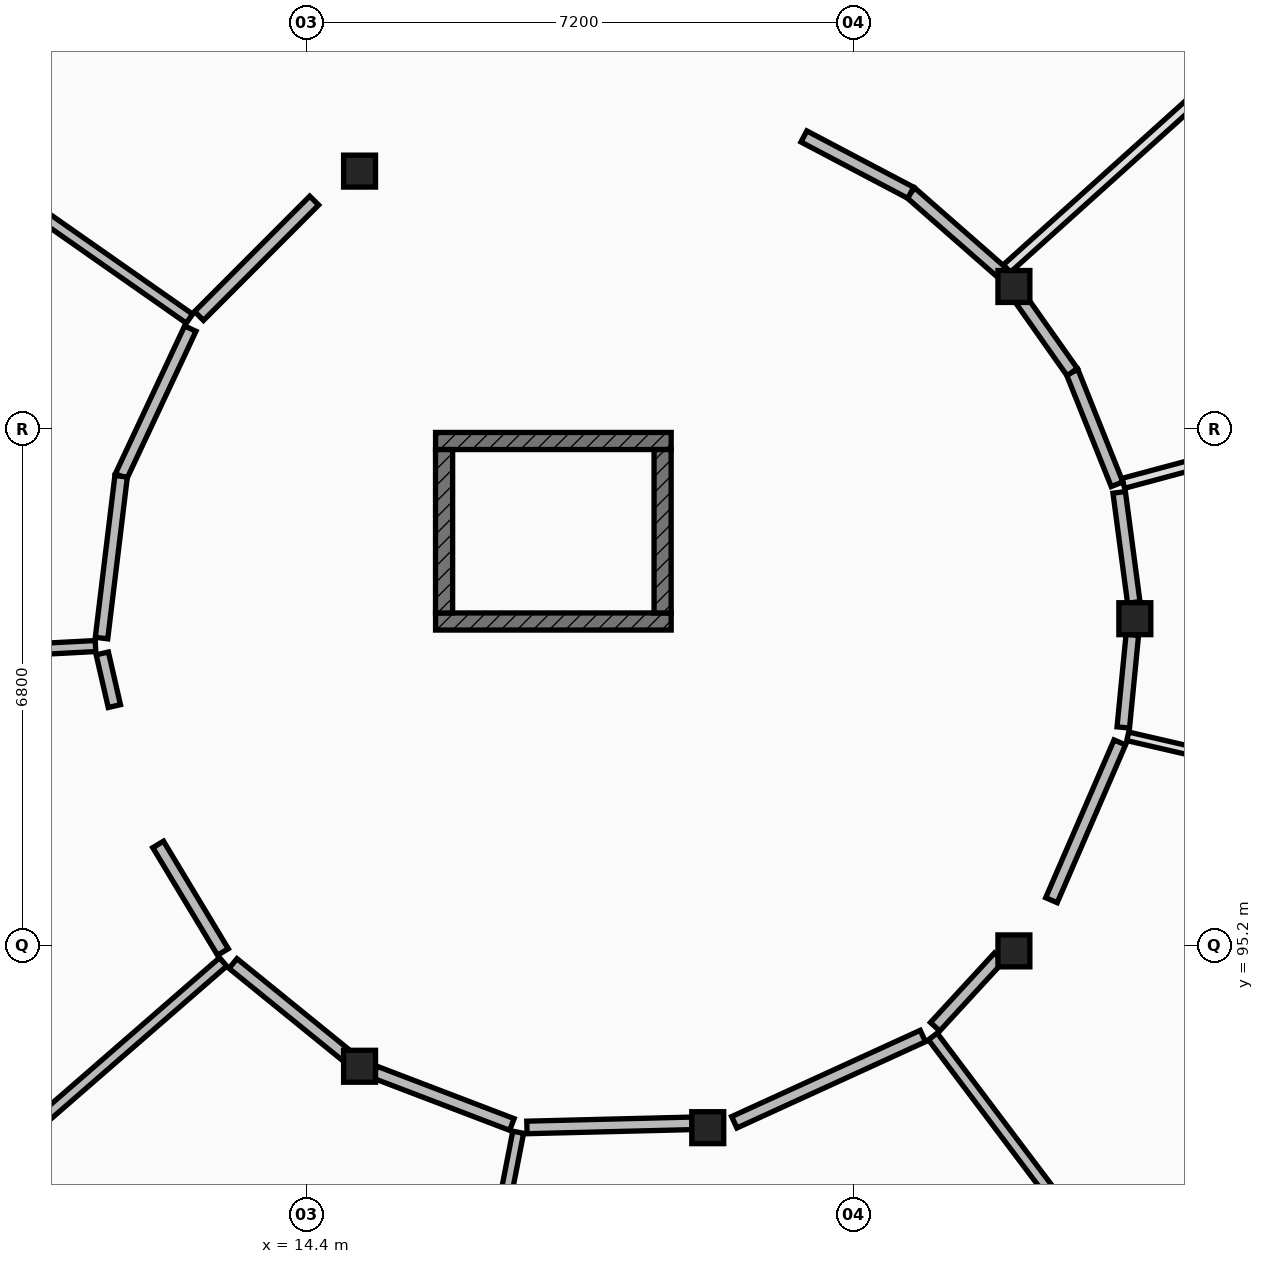
"""IFC4 building model, lengths in metres.
Left out: names, types, materials, properties, quantities, classifications, styles, units other than length and angle.
Written with IfcOpenShell. Run it as: python <this file> out.ifc"""

import sys

from ifc_helpers import new_model, si_unit, direction, frame, frame_2d, origin, origin_2d, place, context, subcontext, project, spatial, rectangle, extrude, element, fill, save


model = new_model("IFC4")
c1 = context("Model", 3, precision=1e-05, world=origin(), true_north=direction((0.0, 1.0)))
c2 = subcontext(c1, "Body", "Model", "MODEL_VIEW")
j1 = project(units=[si_unit("LENGTHUNIT", "METRE"), si_unit("PLANEANGLEUNIT", "RADIAN")], contexts=[c1])
p1 = place(None, origin())
s1 = spatial("IfcSite", under=j1, at=p1, CompositionType="ELEMENT")
p2 = place(p1, origin())
s2 = spatial("IfcBuilding", under=s1, at=p2, CompositionType="ELEMENT")
p3 = place(p2, frame((0.0, 0.0, 4.55)))
s3 = spatial("IfcBuildingStorey", under=s2, at=p3, CompositionType="ELEMENT", Elevation=4.55)
for number, where, z_axis, x_axis in (
    (1, (25.3, 99.5, 0.0), (0.0, 0.0, 1.0), (1.0, 0.0, 0.0)),
    (2, (23.709, 103.871, 0.0), (0.0, 0.0, 1.0), (1.0, 0.0, 0.0)),
    (3, (15.1, 105.389, 0.0), (0.0, 0.0, 1.0), (1.0, 0.0, 0.0)),
    (4, (15.1, 93.611, 0.0), (0.0, 0.0, 1.0), (1.0, 0.0, 0.0)),
    (5, (19.681, 92.803, 0.0), (0.0, 0.0, 1.0), (1.0, 0.0, 0.0)),
    (6, (23.709, 95.129, 0.0), (0.0, 0.0, 1.0), (1.0, 0.0, 0.0)),
):
    element("IfcColumn", number, at=place(p3, frame(where, z_axis=z_axis, x_axis=x_axis)), inside=s3, PredefinedType="COLUMN", context=c2, shape_type="SweptSolid", body=[
        extrude(rectangle(XDim=0.42, YDim=0.42, at=origin_2d()), origin(), (0.0, 0.0, 1.0), 4.2),
    ])
p4 = place(p3, frame((16.1, 99.463, 0.0), z_axis=(0.0, 0.0, 1.0), x_axis=(1.0, 0.0, 0.0)))
e7 = element("IfcWall", 7, at=p4, inside=s3, PredefinedType="SHEAR", context=c2, shape_type="SweptSolid", body=[
    extrude(rectangle(XDim=3.1, YDim=0.225, at=frame_2d((1.55, 0.0))), origin(), (0.0, 0.0, 1.0), 3.955),
])
p5 = place(p4, frame((0.95, 0.0, 0.0)))
e8 = element("IfcOpeningElement", 8, at=p5, cuts=e7, PredefinedType="OPENING", context=c2, shape_type="SweptSolid", body=[
    extrude(rectangle(XDim=1.2, YDim=2.2, at=frame_2d((0.6, 1.1))), frame((0.0, 0.123, 0.0), z_axis=(0.0, -1.0, 0.0), x_axis=(1.0, 0.0, 0.0)), (0.0, 0.0, 1.0), 0.245),
])
p6 = place(p3, frame((16.1, 101.838, 0.0), z_axis=(0.0, 0.0, 1.0), x_axis=(1.0, 0.0, 0.0)))
e9 = element("IfcWall", 9, at=p6, inside=s3, PredefinedType="SHEAR", context=c2, shape_type="SweptSolid", body=[
    extrude(rectangle(XDim=3.1, YDim=0.225, at=frame_2d((1.55, 0.0))), origin(), (0.0, 0.0, 1.0), 3.955),
])
for number, where, z_axis, x_axis in (
    (10, (16.212, 99.575, 0.0), (0.0, 0.0, 1.0), (0.0, 1.0, 0.0)),
    (11, (19.087, 99.575, 0.0), (0.0, 0.0, 1.0), (0.0, 1.0, 0.0)),
):
    element("IfcWall", number, at=place(p3, frame(where, z_axis=z_axis, x_axis=x_axis)), inside=s3, PredefinedType="SHEAR", context=c2, shape_type="SweptSolid", body=[
        extrude(rectangle(XDim=2.15, YDim=0.225, at=frame_2d((1.075, 0.0))), origin(), (0.0, 0.0, 1.0), 3.955),
    ])
p7 = place(p3, frame((12.862, 103.448, 0.0), z_axis=(0.0, 0.0, 1.0), x_axis=(-0.819231920519, 0.573462344363, 0.0)))
e12 = element("IfcWall", 12, at=p7, inside=s3, PredefinedType="PARTITIONING", context=c2, shape_type="SweptSolid", body=[
    extrude(rectangle(XDim=5.868, YDim=0.145, at=frame_2d((2.934, 0.0))), origin(), (0.0, 0.0, 1.0), 3.284),
])
p8 = place(p3, frame((11.626, 99.14, 0.0), z_axis=(0.0, 0.0, 1.0), x_axis=(-0.998634316819, -0.052244629109, 0.0)))
e13 = element("IfcWall", 13, at=p8, inside=s3, PredefinedType="PARTITIONING", context=c2, shape_type="SweptSolid", body=[
    extrude(rectangle(XDim=0.897, YDim=0.145, at=frame_2d((0.449, 0.0))), origin(), (0.0, 0.0, 1.0), 3.284),
])
p9 = place(p3, frame((13.305, 94.984, 0.0), z_axis=(0.0, 0.0, 1.0), x_axis=(-0.754647404393, -0.656130547256, 0.0)))
e14 = element("IfcWall", 14, at=p9, inside=s3, PredefinedType="PARTITIONING", context=c2, shape_type="SweptSolid", body=[
    extrude(rectangle(XDim=5.898, YDim=0.145, at=frame_2d((2.949, 0.0))), origin(), (0.0, 0.0, 1.0), 3.284),
])
p10 = place(p3, frame((17.187, 92.743, 0.0), z_axis=(0.0, 0.0, 1.0), x_axis=(-0.190930602481, -0.981603537604, 0.0)))
e15 = element("IfcWall", 15, at=p10, inside=s3, PredefinedType="PARTITIONING", context=c2, shape_type="SweptSolid", body=[
    extrude(rectangle(XDim=5.897, YDim=0.145, at=frame_2d((2.949, 0.0))), origin(), (0.0, 0.0, 1.0), 3.284),
])
p11 = place(p3, frame((22.642, 94.003, 0.0), z_axis=(0.0, 0.0, 1.0), x_axis=(0.601846782462, -0.798611576701, 0.0)))
e16 = element("IfcWall", 16, at=p11, inside=s3, PredefinedType="PARTITIONING", context=c2, shape_type="SweptSolid", body=[
    extrude(rectangle(XDim=5.875, YDim=0.145, at=frame_2d((2.938, 0.0))), origin(), (0.0, 0.0, 1.0), 3.284),
])
p12 = place(p3, frame((25.207, 97.952, 0.0), z_axis=(0.0, 0.0, 1.0), x_axis=(0.97434915279, -0.225041614944, 0.0)))
e17 = element("IfcWall", 17, at=p12, inside=s3, PredefinedType="PARTITIONING", context=c2, shape_type="SweptSolid", body=[
    extrude(rectangle(XDim=5.875, YDim=0.115, at=frame_2d((2.937, 0.0))), origin(), (0.0, 0.0, 1.0), 3.284),
])
p13 = place(p3, frame((25.148, 101.281, 0.0), z_axis=(0.0, 0.0, 1.0), x_axis=(0.96591239112, 0.258869180632, 0.0)))
e18 = element("IfcWall", 18, at=p13, inside=s3, PredefinedType="PLUMBINGWALL", context=c2, shape_type="SweptSolid", body=[
    extrude(rectangle(XDim=5.868, YDim=0.135, at=frame_2d((2.934, 0.0))), origin(), (0.0, 0.0, 1.0), 3.284),
])
p14 = place(p3, frame((23.615, 104.106, 0.0), z_axis=(0.0, 0.0, 1.0), x_axis=(0.74317862928, 0.669093061525, 0.0)))
e19 = element("IfcWall", 19, at=p14, inside=s3, PredefinedType="PLUMBINGWALL", context=c2, shape_type="SweptSolid", body=[
    extrude(rectangle(XDim=5.885, YDim=0.135, at=frame_2d((2.943, 0.0))), origin(), (0.0, 0.0, 1.0), 3.284),
])
p15 = place(p3, frame((14.503, 105.001, 0.0), z_axis=(0.0, 0.0, 1.0), x_axis=(-0.706366445294, -0.707846342762, 0.0)))
e20 = element("IfcWall", 20, at=p15, inside=s3, PredefinedType="PARTITIONING", context=c2, shape_type="SweptSolid", body=[
    extrude(rectangle(XDim=2.145, YDim=0.165, at=frame_2d((1.072, 0.0))), origin(), (0.0, 0.0, 1.0), 3.284),
])
p16 = place(p15, frame((0.588, 0.0, 0.0)))
e21 = element("IfcOpeningElement", 21, at=p16, cuts=e20, PredefinedType="OPENING", context=c2, shape_type="SweptSolid", body=[
    extrude(rectangle(XDim=0.97, YDim=2.2, at=frame_2d((0.485, 1.1))), frame((0.0, 0.093, 0.0), z_axis=(0.0, -1.0, 0.0), x_axis=(1.0, 0.0, 0.0)), (0.0, 0.0, 1.0), 0.185),
])
p17 = place(p3, frame((12.873, 103.317, 0.0), z_axis=(0.0, 0.0, 1.0), x_axis=(-0.424218123239, -0.905560038824, 0.0)))
e22 = element("IfcWall", 22, at=p17, inside=s3, PredefinedType="PARTITIONING", context=c2, shape_type="SweptSolid", body=[
    extrude(rectangle(XDim=2.146, YDim=0.165, at=frame_2d((1.073, 0.0))), origin(), (0.0, 0.0, 1.0), 3.284),
])
p18 = place(p17, frame((0.578, 0.0, 0.0)))
e23 = element("IfcOpeningElement", 23, at=p18, cuts=e22, PredefinedType="OPENING", context=c2, shape_type="SweptSolid", body=[
    extrude(rectangle(XDim=0.99, YDim=2.22, at=frame_2d((0.495, 1.11))), frame((0.0, 0.093, 0.0), z_axis=(0.0, -1.0, 0.0), x_axis=(1.0, 0.0, 0.0)), (0.0, 0.0, 1.0), 0.185),
])
p19 = place(p3, frame((11.963, 101.374, 0.0), z_axis=(0.0, 0.0, 1.0), x_axis=(-0.120222568092, -0.992746963794, 0.0)))
e24 = element("IfcWall", 24, at=p19, inside=s3, PredefinedType="PARTITIONING", context=c2, shape_type="SweptSolid", body=[
    extrude(rectangle(XDim=2.145, YDim=0.165, at=frame_2d((1.072, 0.0))), origin(), (0.0, 0.0, 1.0), 3.284),
])
p20 = place(p3, frame((11.715, 99.043, 0.0), z_axis=(0.0, 0.0, 1.0), x_axis=(0.223580091663, -0.974685560892, 0.0)))
e25 = element("IfcWall", 25, at=p20, inside=s3, PredefinedType="PARTITIONING", context=c2, shape_type="SweptSolid", body=[
    extrude(rectangle(XDim=0.711, YDim=0.165, at=frame_2d((0.355, 0.0))), origin(), (0.0, 0.0, 1.0), 3.284),
])
p21 = place(p3, frame((12.45, 96.53, 0.0), z_axis=(0.0, 0.0, 1.0), x_axis=(0.515842762515, -0.856683281243, 0.0)))
e26 = element("IfcWall", 26, at=p21, inside=s3, PredefinedType="PARTITIONING", context=c2, shape_type="SweptSolid", body=[
    extrude(rectangle(XDim=1.652, YDim=0.165, at=frame_2d((0.826, 0.0))), origin(), (0.0, 0.0, 1.0), 3.284),
])
p22 = place(p21, frame((0.321, 0.0, 0.0)))
e27 = element("IfcOpeningElement", 27, at=p22, cuts=e26, PredefinedType="OPENING", context=c2, shape_type="SweptSolid", body=[
    extrude(rectangle(XDim=1.01, YDim=2.15, at=frame_2d((0.505, 1.075))), frame((0.0, 0.093, 0.0), z_axis=(0.0, -1.0, 0.0), x_axis=(1.0, 0.0, 0.0)), (0.0, 0.0, 1.0), 0.185),
])
p23 = place(p3, frame((13.435, 94.963, 0.0), z_axis=(0.0, 0.0, 1.0), x_axis=(0.776454505021, -0.63017331079, 0.0)))
e28 = element("IfcWall", 28, at=p23, inside=s3, PredefinedType="PARTITIONING", context=c2, shape_type="SweptSolid", body=[
    extrude(rectangle(XDim=1.929, YDim=0.165, at=frame_2d((0.965, 0.0))), origin(), (0.0, 0.0, 1.0), 3.284),
])
p24 = place(p23, frame((0.45, 0.0, 0.0)))
e29 = element("IfcOpeningElement", 29, at=p24, cuts=e28, PredefinedType="OPENING", context=c2, shape_type="SweptSolid", body=[
    extrude(rectangle(XDim=1.03, YDim=2.18, at=frame_2d((0.515, 1.09))), frame((0.0, 0.093, 0.0), z_axis=(0.0, -1.0, 0.0), x_axis=(1.0, 0.0, 0.0)), (0.0, 0.0, 1.0), 0.185),
])
p25 = place(p3, frame((15.301, 93.534, 0.0), z_axis=(0.0, 0.0, 1.0), x_axis=(0.934122555003, -0.356952450944, 0.0)))
e30 = element("IfcWall", 30, at=p25, inside=s3, PredefinedType="PARTITIONING", context=c2, shape_type="SweptSolid", body=[
    extrude(rectangle(XDim=1.93, YDim=0.165, at=frame_2d((0.965, 0.0))), origin(), (0.0, 0.0, 1.0), 3.284),
])
p26 = place(p3, frame((17.302, 92.806, 0.0), z_axis=(0.0, 0.0, 1.0), x_axis=(0.999688838374, 0.024944466912, 0.0)))
e31 = element("IfcWall", 31, at=p26, inside=s3, PredefinedType="PARTITIONING", context=c2, shape_type="SweptSolid", body=[
    extrude(rectangle(XDim=2.173, YDim=0.165, at=frame_2d((1.086, 0.0))), origin(), (0.0, 0.0, 1.0), 3.284),
])
p27 = place(p26, frame((0.552, 0.0, 0.0)))
e32 = element("IfcOpeningElement", 32, at=p27, cuts=e31, PredefinedType="OPENING", context=c2, shape_type="SweptSolid", body=[
    extrude(rectangle(XDim=1.07, YDim=2.2, at=frame_2d((0.535, 1.1))), frame((0.0, 0.093, 0.0), z_axis=(0.0, -1.0, 0.0), x_axis=(1.0, 0.0, 0.0)), (0.0, 0.0, 1.0), 0.185),
])
p28 = place(p3, frame((20.03, 92.874, 0.0), z_axis=(0.0, 0.0, 1.0), x_axis=(0.909355526696, 0.416019862587, 0.0)))
e33 = element("IfcWall", 33, at=p28, inside=s3, PredefinedType="PARTITIONING", context=c2, shape_type="SweptSolid", body=[
    extrude(rectangle(XDim=2.728, YDim=0.165, at=frame_2d((1.364, 0.0))), origin(), (0.0, 0.0, 1.0), 3.284),
])
p29 = place(p3, frame((22.672, 94.131, 0.0), z_axis=(0.0, 0.0, 1.0), x_axis=(0.677069322474, 0.735919243236, 0.0)))
e34 = element("IfcWall", 34, at=p29, inside=s3, PredefinedType="PARTITIONING", context=c2, shape_type="SweptSolid", body=[
    extrude(rectangle(XDim=1.24, YDim=0.165, at=frame_2d((0.62, 0.0))), origin(), (0.0, 0.0, 1.0), 3.284),
])
p30 = place(p3, frame((24.203, 95.796, 0.0), z_axis=(0.0, 0.0, 1.0), x_axis=(0.397419678039, 0.917636964985, 0.0)))
e35 = element("IfcWall", 35, at=p30, inside=s3, PredefinedType="PARTITIONING", context=c2, shape_type="SweptSolid", body=[
    extrude(rectangle(XDim=2.262, YDim=0.165, at=frame_2d((1.131, 0.0))), origin(), (0.0, 0.0, 1.0), 3.284),
])
p31 = place(p30, frame((0.586, 0.0, 0.0)))
e36 = element("IfcOpeningElement", 36, at=p31, cuts=e35, PredefinedType="OPENING", context=c2, shape_type="SweptSolid", body=[
    extrude(rectangle(XDim=1.09, YDim=2.22, at=frame_2d((0.545, 1.11))), frame((0.0, 0.093, 0.0), z_axis=(0.0, -1.0, 0.0), x_axis=(1.0, 0.0, 0.0)), (0.0, 0.0, 1.0), 0.185),
])
p32 = place(p3, frame((25.148, 98.069, 0.0), z_axis=(0.0, 0.0, 1.0), x_axis=(0.097273334628, 0.995257704502, 0.0)))
e37 = element("IfcWall", 37, at=p32, inside=s3, PredefinedType="PARTITIONING", context=c2, shape_type="SweptSolid", body=[
    extrude(rectangle(XDim=1.225, YDim=0.165, at=frame_2d((0.612, 0.0))), origin(), (0.0, 0.0, 1.0), 3.284),
])
p33 = place(p3, frame((25.286, 99.714, 0.0), z_axis=(0.0, 0.0, 1.0), x_axis=(-0.131375399625, 0.991332691065, 0.0)))
e38 = element("IfcWall", 38, at=p33, inside=s3, PredefinedType="PARTITIONING", context=c2, shape_type="SweptSolid", body=[
    extrude(rectangle(XDim=1.461, YDim=0.165, at=frame_2d((0.73, 0.0))), origin(), (0.0, 0.0, 1.0), 3.284),
])
p34 = place(p33, frame((0.29, 0.0, 0.0)))
e39 = element("IfcOpeningElement", 39, at=p34, cuts=e38, PredefinedType="OPENING", context=c2, shape_type="SweptSolid", body=[
    extrude(rectangle(XDim=0.88, YDim=2.1, at=frame_2d((0.44, 1.05))), frame((0.0, 0.093, 0.0), z_axis=(0.0, -1.0, 0.0), x_axis=(1.0, 0.0, 0.0)), (0.0, 0.0, 1.0), 0.185),
])
p35 = place(p3, frame((25.066, 101.269, 0.0), z_axis=(0.0, 0.0, 1.0), x_axis=(-0.371072882666, 0.928603745281, 0.0)))
e40 = element("IfcWall", 40, at=p35, inside=s3, PredefinedType="PARTITIONING", context=c2, shape_type="SweptSolid", body=[
    extrude(rectangle(XDim=1.59, YDim=0.165, at=frame_2d((0.795, 0.0))), origin(), (0.0, 0.0, 1.0), 3.284),
])
p36 = place(p35, frame((0.325, 0.0, 0.0)))
e41 = element("IfcOpeningElement", 41, at=p36, cuts=e40, PredefinedType="OPENING", context=c2, shape_type="SweptSolid", body=[
    extrude(rectangle(XDim=0.94, YDim=2.1, at=frame_2d((0.47, 1.05))), frame((0.0, 0.093, 0.0), z_axis=(0.0, -1.0, 0.0), x_axis=(1.0, 0.0, 0.0)), (0.0, 0.0, 1.0), 0.185),
])
p37 = place(p3, frame((24.476, 102.745, 0.0), z_axis=(0.0, 0.0, 1.0), x_axis=(-0.576683197599, 0.816967863265, 0.0)))
e42 = element("IfcWall", 42, at=p37, inside=s3, PredefinedType="PARTITIONING", context=c2, shape_type="SweptSolid", body=[
    extrude(rectangle(XDim=1.148, YDim=0.165, at=frame_2d((0.574, 0.0))), origin(), (0.0, 0.0, 1.0), 3.284),
])
p38 = place(p3, frame((23.547, 104.057, 0.0), z_axis=(0.0, 0.0, 1.0), x_axis=(-0.752129161003, 0.659015724523, 0.0)))
e43 = element("IfcWall", 43, at=p38, inside=s3, PredefinedType="PARTITIONING", context=c2, shape_type="SweptSolid", body=[
    extrude(rectangle(XDim=1.589, YDim=0.165, at=frame_2d((0.794, 0.0))), origin(), (0.0, 0.0, 1.0), 3.284),
])
p39 = place(p38, frame((0.305, 0.0, 0.0)))
e44 = element("IfcOpeningElement", 44, at=p39, cuts=e43, PredefinedType="OPENING", context=c2, shape_type="SweptSolid", body=[
    extrude(rectangle(XDim=0.98, YDim=2.1, at=frame_2d((0.49, 1.05))), frame((0.0, 0.093, 0.0), z_axis=(0.0, -1.0, 0.0), x_axis=(1.0, 0.0, 0.0)), (0.0, 0.0, 1.0), 0.185),
])
p40 = place(p3, frame((22.352, 105.104, 0.0), z_axis=(0.0, 0.0, 1.0), x_axis=(-0.884668179212, 0.466221205749, 0.0)))
e45 = element("IfcWall", 45, at=p40, inside=s3, PredefinedType="PARTITIONING", context=c2, shape_type="SweptSolid", body=[
    extrude(rectangle(XDim=1.589, YDim=0.165, at=frame_2d((0.795, 0.0))), origin(), (0.0, 0.0, 1.0), 3.284),
])
p41 = place(p5, origin())
e46 = element("IfcDoor", 46, at=p41, inside=s3, OperationType="DOUBLE_DOOR_SLIDING", PredefinedType="DOOR", context=c2, shape_type="SweptSolid", body=[
    extrude(rectangle(XDim=1.2, YDim=2.2, at=frame_2d((0.6, 1.1))), frame((0.0, 0.025, 0.0), z_axis=(0.0, -1.0, 0.0), x_axis=(1.0, 0.0, 0.0)), (0.0, 0.0, 1.0), 0.05),
])
fill(e8, e46)
p42 = place(p16, origin())
e47 = element("IfcDoor", 47, at=p42, inside=s3, OperationType="SINGLE_SWING_LEFT", PredefinedType="DOOR", context=c2, shape_type="SweptSolid", body=[
    extrude(rectangle(XDim=0.97, YDim=2.2, at=frame_2d((0.485, 1.1))), frame((0.0, 0.025, 0.0), z_axis=(0.0, -1.0, 0.0), x_axis=(1.0, 0.0, 0.0)), (0.0, 0.0, 1.0), 0.05),
])
fill(e21, e47)
p43 = place(p18, origin())
e48 = element("IfcDoor", 48, at=p43, inside=s3, OperationType="SINGLE_SWING_RIGHT", PredefinedType="DOOR", context=c2, shape_type="SweptSolid", body=[
    extrude(rectangle(XDim=0.99, YDim=2.22, at=frame_2d((0.495, 1.11))), frame((0.0, 0.025, 0.0), z_axis=(0.0, -1.0, 0.0), x_axis=(1.0, 0.0, 0.0)), (0.0, 0.0, 1.0), 0.05),
])
fill(e23, e48)
p44 = place(p22, origin())
e49 = element("IfcDoor", 49, at=p44, inside=s3, OperationType="SINGLE_SWING_LEFT", PredefinedType="DOOR", context=c2, shape_type="SweptSolid", body=[
    extrude(rectangle(XDim=1.01, YDim=2.15, at=frame_2d((0.505, 1.075))), frame((0.0, 0.025, 0.0), z_axis=(0.0, -1.0, 0.0), x_axis=(1.0, 0.0, 0.0)), (0.0, 0.0, 1.0), 0.05),
])
fill(e27, e49)
p45 = place(p24, origin())
e50 = element("IfcDoor", 50, at=p45, inside=s3, OperationType="SINGLE_SWING_RIGHT", PredefinedType="DOOR", context=c2, shape_type="SweptSolid", body=[
    extrude(rectangle(XDim=1.03, YDim=2.18, at=frame_2d((0.515, 1.09))), frame((0.0, 0.025, 0.0), z_axis=(0.0, -1.0, 0.0), x_axis=(1.0, 0.0, 0.0)), (0.0, 0.0, 1.0), 0.05),
])
fill(e29, e50)
p46 = place(p27, origin())
e51 = element("IfcDoor", 51, at=p46, inside=s3, OperationType="SINGLE_SWING_LEFT", PredefinedType="DOOR", context=c2, shape_type="SweptSolid", body=[
    extrude(rectangle(XDim=1.07, YDim=2.2, at=frame_2d((0.535, 1.1))), frame((0.0, 0.025, 0.0), z_axis=(0.0, -1.0, 0.0), x_axis=(1.0, 0.0, 0.0)), (0.0, 0.0, 1.0), 0.05),
])
fill(e32, e51)
p47 = place(p31, origin())
e52 = element("IfcDoor", 52, at=p47, inside=s3, OperationType="SINGLE_SWING_RIGHT", PredefinedType="DOOR", context=c2, shape_type="SweptSolid", body=[
    extrude(rectangle(XDim=1.09, YDim=2.22, at=frame_2d((0.545, 1.11))), frame((0.0, 0.025, 0.0), z_axis=(0.0, -1.0, 0.0), x_axis=(1.0, 0.0, 0.0)), (0.0, 0.0, 1.0), 0.05),
])
fill(e36, e52)
p48 = place(p34, origin())
e53 = element("IfcDoor", 53, at=p48, inside=s3, OperationType="SINGLE_SWING_LEFT", PredefinedType="DOOR", context=c2, shape_type="SweptSolid", body=[
    extrude(rectangle(XDim=0.88, YDim=2.1, at=frame_2d((0.44, 1.05))), frame((0.0, 0.025, 0.0), z_axis=(0.0, -1.0, 0.0), x_axis=(1.0, 0.0, 0.0)), (0.0, 0.0, 1.0), 0.05),
])
fill(e39, e53)
p49 = place(p36, origin())
e54 = element("IfcDoor", 54, at=p49, inside=s3, OperationType="SINGLE_SWING_RIGHT", PredefinedType="DOOR", context=c2, shape_type="SweptSolid", body=[
    extrude(rectangle(XDim=0.94, YDim=2.1, at=frame_2d((0.47, 1.05))), frame((0.0, 0.025, 0.0), z_axis=(0.0, -1.0, 0.0), x_axis=(1.0, 0.0, 0.0)), (0.0, 0.0, 1.0), 0.05),
])
fill(e41, e54)
p50 = place(p39, origin())
e55 = element("IfcDoor", 55, at=p50, inside=s3, OperationType="SINGLE_SWING_LEFT", PredefinedType="DOOR", context=c2, shape_type="SweptSolid", body=[
    extrude(rectangle(XDim=0.98, YDim=2.1, at=frame_2d((0.49, 1.05))), frame((0.0, 0.025, 0.0), z_axis=(0.0, -1.0, 0.0), x_axis=(1.0, 0.0, 0.0)), (0.0, 0.0, 1.0), 0.05),
])
fill(e44, e55)
save(model, sys.argv[1])
